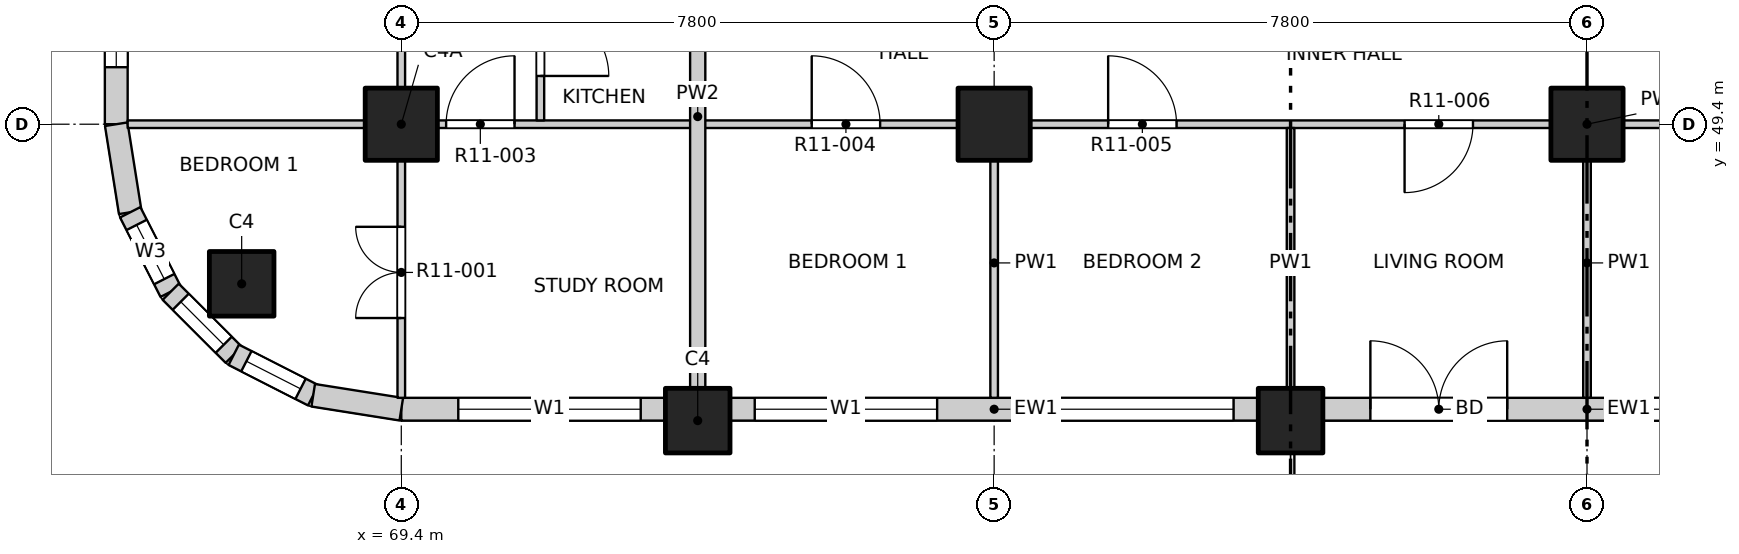
"""IFC4 building model, lengths in metres.
Left out: names, types, materials, properties, quantities, classifications, styles, units other than length and angle.
Written with IfcOpenShell. Run it as: python <this file> out.ifc"""

import sys

from ifc_helpers import new_model, si_unit, direction, frame, frame_2d, origin, origin_2d, place, context, subcontext, project, spatial, rectangle, extrude, element, fill, save


model = new_model("IFC4")
c1 = context("Model", 3, precision=1e-05, world=origin(), true_north=direction((0.0, 1.0)))
c2 = subcontext(c1, "Body", "Model", "MODEL_VIEW")
j1 = project(units=[si_unit("LENGTHUNIT", "METRE"), si_unit("PLANEANGLEUNIT", "RADIAN")], contexts=[c1])
p1 = place(None, origin())
s1 = spatial("IfcSite", under=j1, at=p1, CompositionType="ELEMENT")
p2 = place(p1, origin())
s2 = spatial("IfcBuilding", under=s1, at=p2, CompositionType="ELEMENT")
p3 = place(p2, frame((0.0, 0.0, 130.5)))
s3 = spatial("IfcBuildingStorey", under=s2, at=p3, CompositionType="ELEMENT", Elevation=130.5)
for number, where, z_axis, x_axis in (
    (1, (67.3, 47.3, -0.25), (0.0, 0.0, 1.0), (1.0, 0.0, 0.0)),
    (2, (73.3, 45.5, -0.25), (0.0, 0.0, 1.0), (1.0, 0.0, 0.0)),
    (3, (81.1, 45.5, -0.25), (0.0, 0.0, 1.0), (1.0, 0.0, 0.0)),
):
    element("IfcColumn", number, at=place(p3, frame(where, z_axis=z_axis, x_axis=x_axis)), inside=s3, PredefinedType="COLUMN", context=c2, shape_type="SweptSolid", body=[
        extrude(rectangle(XDim=0.85, YDim=0.85, at=origin_2d()), origin(), (0.0, 0.0, 1.0), 3.4),
    ])
for number, where, z_axis, x_axis in (
    (4, (69.4, 49.4, -0.25), (0.0, 0.0, 1.0), (1.0, 0.0, 0.0)),
    (5, (77.2, 49.4, -0.25), (0.0, 0.0, 1.0), (1.0, 0.0, 0.0)),
    (6, (85.0, 49.4, -0.25), (0.0, 0.0, 1.0), (1.0, 0.0, 0.0)),
):
    element("IfcColumn", number, at=place(p3, frame(where, z_axis=z_axis, x_axis=x_axis)), inside=s3, PredefinedType="COLUMN", context=c2, shape_type="SweptSolid", body=[
        extrude(rectangle(XDim=0.95, YDim=0.95, at=origin_2d()), origin(), (0.0, 0.0, 1.0), 3.4),
    ])
p4 = place(p3, frame((69.4, 45.65, 0.0), z_axis=(0.0, 0.0, 1.0), x_axis=(1.0, 0.0, 0.0)))
e7 = element("IfcWall", 7, at=p4, inside=s3, PredefinedType="SOLIDWALL", context=c2, shape_type="SweptSolid", body=[
    extrude(rectangle(XDim=3.475, YDim=0.3, at=frame_2d((1.738, 0.0))), origin(), (0.0, 0.0, 1.0), 2.7),
])
p5 = place(p4, frame((0.75, 0.0, 0.9)))
e8 = element("IfcOpeningElement", 8, at=p5, cuts=e7, PredefinedType="OPENING", context=c2, shape_type="SweptSolid", body=[
    extrude(rectangle(XDim=2.4, YDim=1.8, at=frame_2d((1.2, 0.9))), frame((0.0, 0.16, 0.0), z_axis=(0.0, -1.0, 0.0), x_axis=(1.0, 0.0, 0.0)), (0.0, 0.0, 1.0), 0.32),
])
p6 = place(p3, frame((73.725, 45.65, 0.0), z_axis=(0.0, 0.0, 1.0), x_axis=(1.0, 0.0, 0.0)))
e9 = element("IfcWall", 9, at=p6, inside=s3, PredefinedType="SOLIDWALL", context=c2, shape_type="SweptSolid", body=[
    extrude(rectangle(XDim=6.95, YDim=0.3, at=frame_2d((3.475, 0.0))), origin(), (0.0, 0.0, 1.0), 2.7),
])
p7 = place(p6, frame((0.325, 0.0, 0.9)))
e10 = element("IfcOpeningElement", 10, at=p7, cuts=e9, PredefinedType="OPENING", context=c2, shape_type="SweptSolid", body=[
    extrude(rectangle(XDim=2.4, YDim=1.8, at=frame_2d((1.2, 0.9))), frame((0.0, 0.16, 0.0), z_axis=(0.0, -1.0, 0.0), x_axis=(1.0, 0.0, 0.0)), (0.0, 0.0, 1.0), 0.32),
])
p8 = place(p6, frame((4.225, 0.0, 0.9)))
e11 = element("IfcOpeningElement", 11, at=p8, cuts=e9, PredefinedType="OPENING", context=c2, shape_type="SweptSolid", body=[
    extrude(rectangle(XDim=2.4, YDim=1.8, at=frame_2d((1.2, 0.9))), frame((0.0, 0.16, 0.0), z_axis=(0.0, -1.0, 0.0), x_axis=(1.0, 0.0, 0.0)), (0.0, 0.0, 1.0), 0.32),
])
p9 = place(p3, frame((81.525, 45.65, 0.0), z_axis=(0.0, 0.0, 1.0), x_axis=(1.0, 0.0, 0.0)))
e12 = element("IfcWall", 12, at=p9, inside=s3, PredefinedType="SOLIDWALL", context=c2, shape_type="SweptSolid", body=[
    extrude(rectangle(XDim=6.95, YDim=0.3, at=frame_2d((3.475, 0.0))), origin(), (0.0, 0.0, 1.0), 2.7),
])
p10 = place(p9, frame((0.625, 0.0, 0.0)))
e13 = element("IfcOpeningElement", 13, at=p10, cuts=e12, PredefinedType="OPENING", context=c2, shape_type="SweptSolid", body=[
    extrude(rectangle(XDim=1.8, YDim=2.4, at=frame_2d((0.9, 1.2))), frame((0.0, 0.16, 0.0), z_axis=(0.0, -1.0, 0.0), x_axis=(1.0, 0.0, 0.0)), (0.0, 0.0, 1.0), 0.32),
])
p11 = place(p9, frame((4.225, 0.0, 0.9)))
e14 = element("IfcOpeningElement", 14, at=p11, cuts=e12, PredefinedType="OPENING", context=c2, shape_type="SweptSolid", body=[
    extrude(rectangle(XDim=2.4, YDim=1.8, at=frame_2d((1.2, 0.9))), frame((0.0, 0.16, 0.0), z_axis=(0.0, -1.0, 0.0), x_axis=(1.0, 0.0, 0.0)), (0.0, 0.0, 1.0), 0.32),
])
p12 = place(p3, frame((65.65, 49.4, 0.0), z_axis=(0.0, 0.0, 1.0), x_axis=(0.0, 1.0, 0.0)))
e15 = element("IfcWall", 15, at=p12, inside=s3, PredefinedType="SOLIDWALL", context=c2, shape_type="SweptSolid", body=[
    extrude(rectangle(XDim=3.475, YDim=0.3, at=frame_2d((1.738, 0.0))), origin(), (0.0, 0.0, 1.0), 2.7),
])
p13 = place(p12, frame((0.75, 0.0, 0.9)))
e16 = element("IfcOpeningElement", 16, at=p13, cuts=e15, PredefinedType="OPENING", context=c2, shape_type="SweptSolid", body=[
    extrude(rectangle(XDim=2.4, YDim=1.8, at=frame_2d((1.2, 0.9))), frame((0.0, 0.16, 0.0), z_axis=(0.0, -1.0, 0.0), x_axis=(1.0, 0.0, 0.0)), (0.0, 0.0, 1.0), 0.32),
])
p14 = place(p3, frame((65.65, 49.4, 0.0), z_axis=(0.0, 0.0, 1.0), x_axis=(0.156496880861, -0.987678452879, 0.0)))
e17 = element("IfcWall", 17, at=p14, inside=s3, PredefinedType="SOLIDWALL", context=c2, shape_type="SweptSolid", body=[
    extrude(rectangle(XDim=1.173, YDim=0.3, at=frame_2d((0.586, 0.0))), origin(), (0.0, 0.0, 1.0), 2.7),
])
p15 = place(p3, frame((65.833, 48.241, 0.0), z_axis=(0.0, 0.0, 1.0), x_axis=(0.454025524128, -0.890988677504, 0.0)))
e18 = element("IfcWall", 18, at=p15, inside=s3, PredefinedType="SOLIDWALL", context=c2, shape_type="SweptSolid", body=[
    extrude(rectangle(XDim=1.173, YDim=0.3, at=frame_2d((0.587, 0.0))), origin(), (0.0, 0.0, 1.0), 2.7),
])
p16 = place(p15, frame((0.187, 0.0, 0.9)))
e19 = element("IfcOpeningElement", 19, at=p16, cuts=e18, PredefinedType="OPENING", context=c2, shape_type="SweptSolid", body=[
    extrude(rectangle(XDim=0.8, YDim=1.2, at=frame_2d((0.4, 0.6))), frame((0.0, 0.16, 0.0), z_axis=(0.0, -1.0, 0.0), x_axis=(1.0, 0.0, 0.0)), (0.0, 0.0, 1.0), 0.32),
])
p17 = place(p3, frame((66.366, 47.196, 0.0), z_axis=(0.0, 0.0, 1.0), x_axis=(0.707106781187, -0.707106781187, 0.0)))
e20 = element("IfcWall", 20, at=p17, inside=s3, PredefinedType="SOLIDWALL", context=c2, shape_type="SweptSolid", body=[
    extrude(rectangle(XDim=1.173, YDim=0.3, at=frame_2d((0.586, 0.0))), origin(), (0.0, 0.0, 1.0), 2.7),
])
p18 = place(p17, frame((0.187, 0.0, 0.9)))
e21 = element("IfcOpeningElement", 21, at=p18, cuts=e20, PredefinedType="OPENING", context=c2, shape_type="SweptSolid", body=[
    extrude(rectangle(XDim=0.8, YDim=1.2, at=frame_2d((0.4, 0.6))), frame((0.0, 0.16, 0.0), z_axis=(0.0, -1.0, 0.0), x_axis=(1.0, 0.0, 0.0)), (0.0, 0.0, 1.0), 0.32),
])
p19 = place(p3, frame((67.196, 46.366, 0.0), z_axis=(0.0, 0.0, 1.0), x_axis=(0.890988677504, -0.454025524128, 0.0)))
e22 = element("IfcWall", 22, at=p19, inside=s3, PredefinedType="SOLIDWALL", context=c2, shape_type="SweptSolid", body=[
    extrude(rectangle(XDim=1.173, YDim=0.3, at=frame_2d((0.587, 0.0))), origin(), (0.0, 0.0, 1.0), 2.7),
])
p20 = place(p19, frame((0.187, 0.0, 0.9)))
e23 = element("IfcOpeningElement", 23, at=p20, cuts=e22, PredefinedType="OPENING", context=c2, shape_type="SweptSolid", body=[
    extrude(rectangle(XDim=0.8, YDim=1.2, at=frame_2d((0.4, 0.6))), frame((0.0, 0.16, 0.0), z_axis=(0.0, -1.0, 0.0), x_axis=(1.0, 0.0, 0.0)), (0.0, 0.0, 1.0), 0.32),
])
p21 = place(p3, frame((68.241, 45.833, 0.0), z_axis=(0.0, 0.0, 1.0), x_axis=(0.987678452879, -0.156496880861, 0.0)))
e24 = element("IfcWall", 24, at=p21, inside=s3, PredefinedType="SOLIDWALL", context=c2, shape_type="SweptSolid", body=[
    extrude(rectangle(XDim=1.173, YDim=0.3, at=frame_2d((0.586, 0.0))), origin(), (0.0, 0.0, 1.0), 2.7),
])
p22 = place(p3, frame((65.8, 49.4, 0.0), z_axis=(0.0, 0.0, 1.0), x_axis=(1.0, 0.0, 0.0)))
e25 = element("IfcWall", 25, at=p22, inside=s3, PredefinedType="PARTITIONING", context=c2, shape_type="SweptSolid", body=[
    extrude(rectangle(XDim=38.4, YDim=0.1, at=frame_2d((19.2, 0.0))), origin(), (0.0, 0.0, 1.0), 3.15),
])
p23 = place(p22, frame((4.19, 0.0, 0.0)))
e26 = element("IfcOpeningElement", 26, at=p23, cuts=e25, PredefinedType="OPENING", context=c2, shape_type="SweptSolid", body=[
    extrude(rectangle(XDim=0.9, YDim=2.1, at=frame_2d((0.45, 1.05))), frame((0.0, 0.06, 0.0), z_axis=(0.0, -1.0, 0.0), x_axis=(1.0, 0.0, 0.0)), (0.0, 0.0, 1.0), 0.12),
])
p24 = place(p22, frame((9.0, 0.0, 0.0)))
e27 = element("IfcOpeningElement", 27, at=p24, cuts=e25, PredefinedType="OPENING", context=c2, shape_type="SweptSolid", body=[
    extrude(rectangle(XDim=0.9, YDim=2.1, at=frame_2d((0.45, 1.05))), frame((0.0, 0.06, 0.0), z_axis=(0.0, -1.0, 0.0), x_axis=(1.0, 0.0, 0.0)), (0.0, 0.0, 1.0), 0.12),
])
p25 = place(p22, frame((12.9, 0.0, 0.0)))
e28 = element("IfcOpeningElement", 28, at=p25, cuts=e25, PredefinedType="OPENING", context=c2, shape_type="SweptSolid", body=[
    extrude(rectangle(XDim=0.9, YDim=2.1, at=frame_2d((0.45, 1.05))), frame((0.0, 0.06, 0.0), z_axis=(0.0, -1.0, 0.0), x_axis=(1.0, 0.0, 0.0)), (0.0, 0.0, 1.0), 0.12),
])
p26 = place(p22, frame((16.8, 0.0, 0.0)))
e29 = element("IfcOpeningElement", 29, at=p26, cuts=e25, PredefinedType="OPENING", context=c2, shape_type="SweptSolid", body=[
    extrude(rectangle(XDim=0.9, YDim=2.1, at=frame_2d((0.45, 1.05))), frame((0.0, 0.06, 0.0), z_axis=(0.0, -1.0, 0.0), x_axis=(1.0, 0.0, 0.0)), (0.0, 0.0, 1.0), 0.12),
])
p27 = place(p22, frame((20.7, 0.0, 0.0)))
e30 = element("IfcOpeningElement", 30, at=p27, cuts=e25, PredefinedType="OPENING", context=c2, shape_type="SweptSolid", body=[
    extrude(rectangle(XDim=0.9, YDim=2.1, at=frame_2d((0.45, 1.05))), frame((0.0, 0.06, 0.0), z_axis=(0.0, -1.0, 0.0), x_axis=(1.0, 0.0, 0.0)), (0.0, 0.0, 1.0), 0.12),
])
p28 = place(p22, frame((24.6, 0.0, 0.0)))
e31 = element("IfcOpeningElement", 31, at=p28, cuts=e25, PredefinedType="OPENING", context=c2, shape_type="SweptSolid", body=[
    extrude(rectangle(XDim=0.9, YDim=2.1, at=frame_2d((0.45, 1.05))), frame((0.0, 0.06, 0.0), z_axis=(0.0, -1.0, 0.0), x_axis=(1.0, 0.0, 0.0)), (0.0, 0.0, 1.0), 0.12),
])
p29 = place(p22, frame((28.5, 0.0, 0.0)))
e32 = element("IfcOpeningElement", 32, at=p29, cuts=e25, PredefinedType="OPENING", context=c2, shape_type="SweptSolid", body=[
    extrude(rectangle(XDim=0.9, YDim=2.1, at=frame_2d((0.45, 1.05))), frame((0.0, 0.06, 0.0), z_axis=(0.0, -1.0, 0.0), x_axis=(1.0, 0.0, 0.0)), (0.0, 0.0, 1.0), 0.12),
])
p30 = place(p22, frame((33.31, 0.0, 0.0)))
e33 = element("IfcOpeningElement", 33, at=p30, cuts=e25, PredefinedType="OPENING", context=c2, shape_type="SweptSolid", body=[
    extrude(rectangle(XDim=0.9, YDim=2.1, at=frame_2d((0.45, 1.05))), frame((0.0, 0.06, 0.0), z_axis=(0.0, -1.0, 0.0), x_axis=(1.0, 0.0, 0.0)), (0.0, 0.0, 1.0), 0.12),
])
p31 = place(p3, frame((69.4, 45.8, 0.0), z_axis=(0.0, 0.0, 1.0), x_axis=(0.0, 1.0, 0.0)))
e34 = element("IfcWall", 34, at=p31, inside=s3, PredefinedType="PARTITIONING", context=c2, shape_type="SweptSolid", body=[
    extrude(rectangle(XDim=38.4, YDim=0.1, at=frame_2d((19.2, 0.0))), origin(), (0.0, 0.0, 1.0), 3.15),
])
p32 = place(p31, frame((1.05, 0.0, 0.0)))
e35 = element("IfcOpeningElement", 35, at=p32, cuts=e34, PredefinedType="OPENING", context=c2, shape_type="SweptSolid", body=[
    extrude(rectangle(XDim=1.2, YDim=2.1, at=frame_2d((0.6, 1.05))), frame((0.0, 0.06, 0.0), z_axis=(0.0, -1.0, 0.0), x_axis=(1.0, 0.0, 0.0)), (0.0, 0.0, 1.0), 0.12),
])
p33 = place(p31, frame((6.9, 0.0, 0.0)))
e36 = element("IfcOpeningElement", 36, at=p33, cuts=e34, PredefinedType="OPENING", context=c2, shape_type="SweptSolid", body=[
    extrude(rectangle(XDim=1.2, YDim=2.1, at=frame_2d((0.6, 1.05))), frame((0.0, 0.06, 0.0), z_axis=(0.0, -1.0, 0.0), x_axis=(1.0, 0.0, 0.0)), (0.0, 0.0, 1.0), 0.12),
])
p34 = place(p31, frame((12.9, 0.0, 0.0)))
e37 = element("IfcOpeningElement", 37, at=p34, cuts=e34, PredefinedType="OPENING", context=c2, shape_type="SweptSolid", body=[
    extrude(rectangle(XDim=0.9, YDim=2.1, at=frame_2d((0.45, 1.05))), frame((0.0, 0.06, 0.0), z_axis=(0.0, -1.0, 0.0), x_axis=(1.0, 0.0, 0.0)), (0.0, 0.0, 1.0), 0.12),
])
p35 = place(p31, frame((19.775, 0.0, 0.0)))
e38 = element("IfcOpeningElement", 38, at=p35, cuts=e34, PredefinedType="OPENING", context=c2, shape_type="SweptSolid", body=[
    extrude(rectangle(XDim=1.2, YDim=2.1, at=frame_2d((0.6, 1.05))), frame((0.0, 0.06, 0.0), z_axis=(0.0, -1.0, 0.0), x_axis=(1.0, 0.0, 0.0)), (0.0, 0.0, 1.0), 0.12),
])
p36 = place(p31, frame((24.6, 0.0, 0.0)))
e39 = element("IfcOpeningElement", 39, at=p36, cuts=e34, PredefinedType="OPENING", context=c2, shape_type="SweptSolid", body=[
    extrude(rectangle(XDim=0.9, YDim=2.1, at=frame_2d((0.45, 1.05))), frame((0.0, 0.06, 0.0), z_axis=(0.0, -1.0, 0.0), x_axis=(1.0, 0.0, 0.0)), (0.0, 0.0, 1.0), 0.12),
])
p37 = place(p31, frame((30.3, 0.0, 0.0)))
e40 = element("IfcOpeningElement", 40, at=p37, cuts=e34, PredefinedType="OPENING", context=c2, shape_type="SweptSolid", body=[
    extrude(rectangle(XDim=1.2, YDim=2.1, at=frame_2d((0.6, 1.05))), frame((0.0, 0.06, 0.0), z_axis=(0.0, -1.0, 0.0), x_axis=(1.0, 0.0, 0.0)), (0.0, 0.0, 1.0), 0.12),
])
p38 = place(p31, frame((36.15, 0.0, 0.0)))
e41 = element("IfcOpeningElement", 41, at=p38, cuts=e34, PredefinedType="OPENING", context=c2, shape_type="SweptSolid", body=[
    extrude(rectangle(XDim=1.2, YDim=2.1, at=frame_2d((0.6, 1.05))), frame((0.0, 0.06, 0.0), z_axis=(0.0, -1.0, 0.0), x_axis=(1.0, 0.0, 0.0)), (0.0, 0.0, 1.0), 0.12),
])
p39 = place(p3, frame((71.23, 49.45, 0.0), z_axis=(0.0, 0.0, 1.0), x_axis=(0.0, 1.0, 0.0)))
e42 = element("IfcWall", 42, at=p39, inside=s3, PredefinedType="PARTITIONING", context=c2, shape_type="SweptSolid", body=[
    extrude(rectangle(XDim=5.5, YDim=0.1, at=frame_2d((2.75, 0.0))), origin(), (0.0, 0.0, 1.0), 3.15),
])
p40 = place(p39, frame((0.585, 0.0, 0.0)))
e43 = element("IfcOpeningElement", 43, at=p40, cuts=e42, PredefinedType="OPENING", context=c2, shape_type="SweptSolid", body=[
    extrude(rectangle(XDim=0.9, YDim=2.1, at=frame_2d((0.45, 1.05))), frame((0.0, 0.06, 0.0), z_axis=(0.0, -1.0, 0.0), x_axis=(1.0, 0.0, 0.0)), (0.0, 0.0, 1.0), 0.12),
])
p41 = place(p39, frame((2.61, 0.0, 0.0)))
e44 = element("IfcOpeningElement", 44, at=p41, cuts=e42, PredefinedType="OPENING", context=c2, shape_type="SweptSolid", body=[
    extrude(rectangle(XDim=0.9, YDim=2.1, at=frame_2d((0.45, 1.05))), frame((0.0, 0.06, 0.0), z_axis=(0.0, -1.0, 0.0), x_axis=(1.0, 0.0, 0.0)), (0.0, 0.0, 1.0), 0.12),
])
p42 = place(p39, frame((4.375, 0.0, 0.0)))
e45 = element("IfcOpeningElement", 45, at=p42, cuts=e42, PredefinedType="OPENING", context=c2, shape_type="SweptSolid", body=[
    extrude(rectangle(XDim=0.8, YDim=2.1, at=frame_2d((0.4, 1.05))), frame((0.0, 0.06, 0.0), z_axis=(0.0, -1.0, 0.0), x_axis=(1.0, 0.0, 0.0)), (0.0, 0.0, 1.0), 0.12),
])
p43 = place(p3, frame((73.3, 45.8, 0.0), z_axis=(0.0, 0.0, 1.0), x_axis=(0.0, 1.0, 0.0)))
e46 = element("IfcWall", 46, at=p43, inside=s3, PredefinedType="PARTITIONING", context=c2, shape_type="SweptSolid", body=[
    extrude(rectangle(XDim=7.4, YDim=0.2, at=frame_2d((3.7, 0.0))), origin(), (0.0, 0.0, 1.0), 3.15),
])
p44 = place(p3, frame((77.2, 45.8, 0.0), z_axis=(0.0, 0.0, 1.0), x_axis=(0.0, 1.0, 0.0)))
e47 = element("IfcWall", 47, at=p44, inside=s3, PredefinedType="PARTITIONING", context=c2, shape_type="SweptSolid", body=[
    extrude(rectangle(XDim=3.55, YDim=0.1, at=frame_2d((1.775, 0.0))), origin(), (0.0, 0.0, 1.0), 3.15),
])
p45 = place(p3, frame((81.1, 45.8, 0.0), z_axis=(0.0, 0.0, 1.0), x_axis=(0.0, 1.0, 0.0)))
e48 = element("IfcWall", 48, at=p45, inside=s3, PredefinedType="PARTITIONING", context=c2, shape_type="SweptSolid", body=[
    extrude(rectangle(XDim=3.55, YDim=0.1, at=frame_2d((1.775, 0.0))), origin(), (0.0, 0.0, 1.0), 2.55),
])
p46 = place(p3, frame((85.0, 45.8, 0.0), z_axis=(0.0, 0.0, 1.0), x_axis=(0.0, 1.0, 0.0)))
e49 = element("IfcWall", 49, at=p46, inside=s3, PredefinedType="PARTITIONING", context=c2, shape_type="SweptSolid", body=[
    extrude(rectangle(XDim=3.55, YDim=0.1, at=frame_2d((1.775, 0.0))), origin(), (0.0, 0.0, 1.0), 3.15),
])
p47 = place(p5, origin())
e50 = element("IfcWindow", 50, at=p47, inside=s3, PartitioningType="DOUBLE_PANEL_VERTICAL", PredefinedType="WINDOW", context=c2, shape_type="SweptSolid", body=[
    extrude(rectangle(XDim=2.4, YDim=1.8, at=frame_2d((1.2, 0.9))), frame((0.0, 0.03, 0.0), z_axis=(0.0, -1.0, 0.0), x_axis=(1.0, 0.0, 0.0)), (0.0, 0.0, 1.0), 0.06),
])
fill(e8, e50)
p48 = place(p7, origin())
e51 = element("IfcWindow", 51, at=p48, inside=s3, PartitioningType="DOUBLE_PANEL_VERTICAL", PredefinedType="WINDOW", context=c2, shape_type="SweptSolid", body=[
    extrude(rectangle(XDim=2.4, YDim=1.8, at=frame_2d((1.2, 0.9))), frame((0.0, 0.03, 0.0), z_axis=(0.0, -1.0, 0.0), x_axis=(1.0, 0.0, 0.0)), (0.0, 0.0, 1.0), 0.06),
])
fill(e10, e51)
p49 = place(p8, origin())
e52 = element("IfcWindow", 52, at=p49, inside=s3, PartitioningType="DOUBLE_PANEL_VERTICAL", PredefinedType="WINDOW", context=c2, shape_type="SweptSolid", body=[
    extrude(rectangle(XDim=2.4, YDim=1.8, at=frame_2d((1.2, 0.9))), frame((0.0, 0.03, 0.0), z_axis=(0.0, -1.0, 0.0), x_axis=(1.0, 0.0, 0.0)), (0.0, 0.0, 1.0), 0.06),
])
fill(e11, e52)
p50 = place(p10, origin())
e53 = element("IfcDoor", 53, at=p50, inside=s3, OperationType="DOUBLE_DOOR_SINGLE_SWING", PredefinedType="DOOR", context=c2, shape_type="SweptSolid", body=[
    extrude(rectangle(XDim=1.8, YDim=2.4, at=frame_2d((0.9, 1.2))), frame((0.0, 0.025, 0.0), z_axis=(0.0, -1.0, 0.0), x_axis=(1.0, 0.0, 0.0)), (0.0, 0.0, 1.0), 0.05),
])
fill(e13, e53)
p51 = place(p11, origin())
e54 = element("IfcWindow", 54, at=p51, inside=s3, PartitioningType="DOUBLE_PANEL_VERTICAL", PredefinedType="WINDOW", context=c2, shape_type="SweptSolid", body=[
    extrude(rectangle(XDim=2.4, YDim=1.8, at=frame_2d((1.2, 0.9))), frame((0.0, 0.03, 0.0), z_axis=(0.0, -1.0, 0.0), x_axis=(1.0, 0.0, 0.0)), (0.0, 0.0, 1.0), 0.06),
])
fill(e14, e54)
p52 = place(p13, origin())
e55 = element("IfcWindow", 55, at=p52, inside=s3, PartitioningType="DOUBLE_PANEL_VERTICAL", PredefinedType="WINDOW", context=c2, shape_type="SweptSolid", body=[
    extrude(rectangle(XDim=2.4, YDim=1.8, at=frame_2d((1.2, 0.9))), frame((0.0, 0.03, 0.0), z_axis=(0.0, -1.0, 0.0), x_axis=(1.0, 0.0, 0.0)), (0.0, 0.0, 1.0), 0.06),
])
fill(e16, e55)
p53 = place(p16, origin())
e56 = element("IfcWindow", 56, at=p53, inside=s3, PartitioningType="SINGLE_PANEL", PredefinedType="WINDOW", context=c2, shape_type="SweptSolid", body=[
    extrude(rectangle(XDim=0.8, YDim=1.2, at=frame_2d((0.4, 0.6))), frame((0.0, 0.03, 0.0), z_axis=(0.0, -1.0, 0.0), x_axis=(1.0, 0.0, 0.0)), (0.0, 0.0, 1.0), 0.06),
])
fill(e19, e56)
p54 = place(p18, origin())
e57 = element("IfcWindow", 57, at=p54, inside=s3, PartitioningType="SINGLE_PANEL", PredefinedType="WINDOW", context=c2, shape_type="SweptSolid", body=[
    extrude(rectangle(XDim=0.8, YDim=1.2, at=frame_2d((0.4, 0.6))), frame((0.0, 0.03, 0.0), z_axis=(0.0, -1.0, 0.0), x_axis=(1.0, 0.0, 0.0)), (0.0, 0.0, 1.0), 0.06),
])
fill(e21, e57)
p55 = place(p20, origin())
e58 = element("IfcWindow", 58, at=p55, inside=s3, PartitioningType="SINGLE_PANEL", PredefinedType="WINDOW", context=c2, shape_type="SweptSolid", body=[
    extrude(rectangle(XDim=0.8, YDim=1.2, at=frame_2d((0.4, 0.6))), frame((0.0, 0.03, 0.0), z_axis=(0.0, -1.0, 0.0), x_axis=(1.0, 0.0, 0.0)), (0.0, 0.0, 1.0), 0.06),
])
fill(e23, e58)
p56 = place(p32, origin())
e59 = element("IfcDoor", 59, at=p56, inside=s3, OperationType="DOUBLE_DOOR_SINGLE_SWING", PredefinedType="DOOR", context=c2, shape_type="SweptSolid", body=[
    extrude(rectangle(XDim=1.2, YDim=2.1, at=frame_2d((0.6, 1.05))), frame((0.0, 0.025, 0.0), z_axis=(0.0, -1.0, 0.0), x_axis=(1.0, 0.0, 0.0)), (0.0, 0.0, 1.0), 0.05),
])
fill(e35, e59)
p57 = place(p23, origin())
e60 = element("IfcDoor", 60, at=p57, inside=s3, OperationType="SINGLE_SWING_RIGHT", PredefinedType="DOOR", context=c2, shape_type="SweptSolid", body=[
    extrude(rectangle(XDim=0.9, YDim=2.1, at=frame_2d((0.45, 1.05))), frame((0.0, 0.025, 0.0), z_axis=(0.0, -1.0, 0.0), x_axis=(1.0, 0.0, 0.0)), (0.0, 0.0, 1.0), 0.05),
])
fill(e26, e60)
p58 = place(p24, origin())
e61 = element("IfcDoor", 61, at=p58, inside=s3, OperationType="SINGLE_SWING_LEFT", PredefinedType="DOOR", context=c2, shape_type="SweptSolid", body=[
    extrude(rectangle(XDim=0.9, YDim=2.1, at=frame_2d((0.45, 1.05))), frame((0.0, 0.025, 0.0), z_axis=(0.0, -1.0, 0.0), x_axis=(1.0, 0.0, 0.0)), (0.0, 0.0, 1.0), 0.05),
])
fill(e27, e61)
p59 = place(p25, origin())
e62 = element("IfcDoor", 62, at=p59, inside=s3, OperationType="SINGLE_SWING_LEFT", PredefinedType="DOOR", context=c2, shape_type="SweptSolid", body=[
    extrude(rectangle(XDim=0.9, YDim=2.1, at=frame_2d((0.45, 1.05))), frame((0.0, 0.025, 0.0), z_axis=(0.0, -1.0, 0.0), x_axis=(1.0, 0.0, 0.0)), (0.0, 0.0, 1.0), 0.05),
])
fill(e28, e62)
p60 = place(p26, origin())
e63 = element("IfcDoor", 63, at=p60, inside=s3, OperationType="SINGLE_SWING_RIGHT", PredefinedType="DOOR", context=c2, shape_type="SweptSolid", body=[
    extrude(rectangle(XDim=0.9, YDim=2.1, at=frame_2d((0.45, 1.05))), frame((0.0, 0.025, 0.0), z_axis=(0.0, -1.0, 0.0), x_axis=(1.0, 0.0, 0.0)), (0.0, 0.0, 1.0), 0.05),
])
fill(e29, e63)
p61 = place(p40, origin())
e64 = element("IfcDoor", 64, at=p61, inside=s3, OperationType="SINGLE_SWING_RIGHT", PredefinedType="DOOR", context=c2, shape_type="SweptSolid", body=[
    extrude(rectangle(XDim=0.9, YDim=2.1, at=frame_2d((0.45, 1.05))), frame((0.0, 0.025, 0.0), z_axis=(0.0, -1.0, 0.0), x_axis=(1.0, 0.0, 0.0)), (0.0, 0.0, 1.0), 0.05),
])
fill(e43, e64)
save(model, sys.argv[1])
